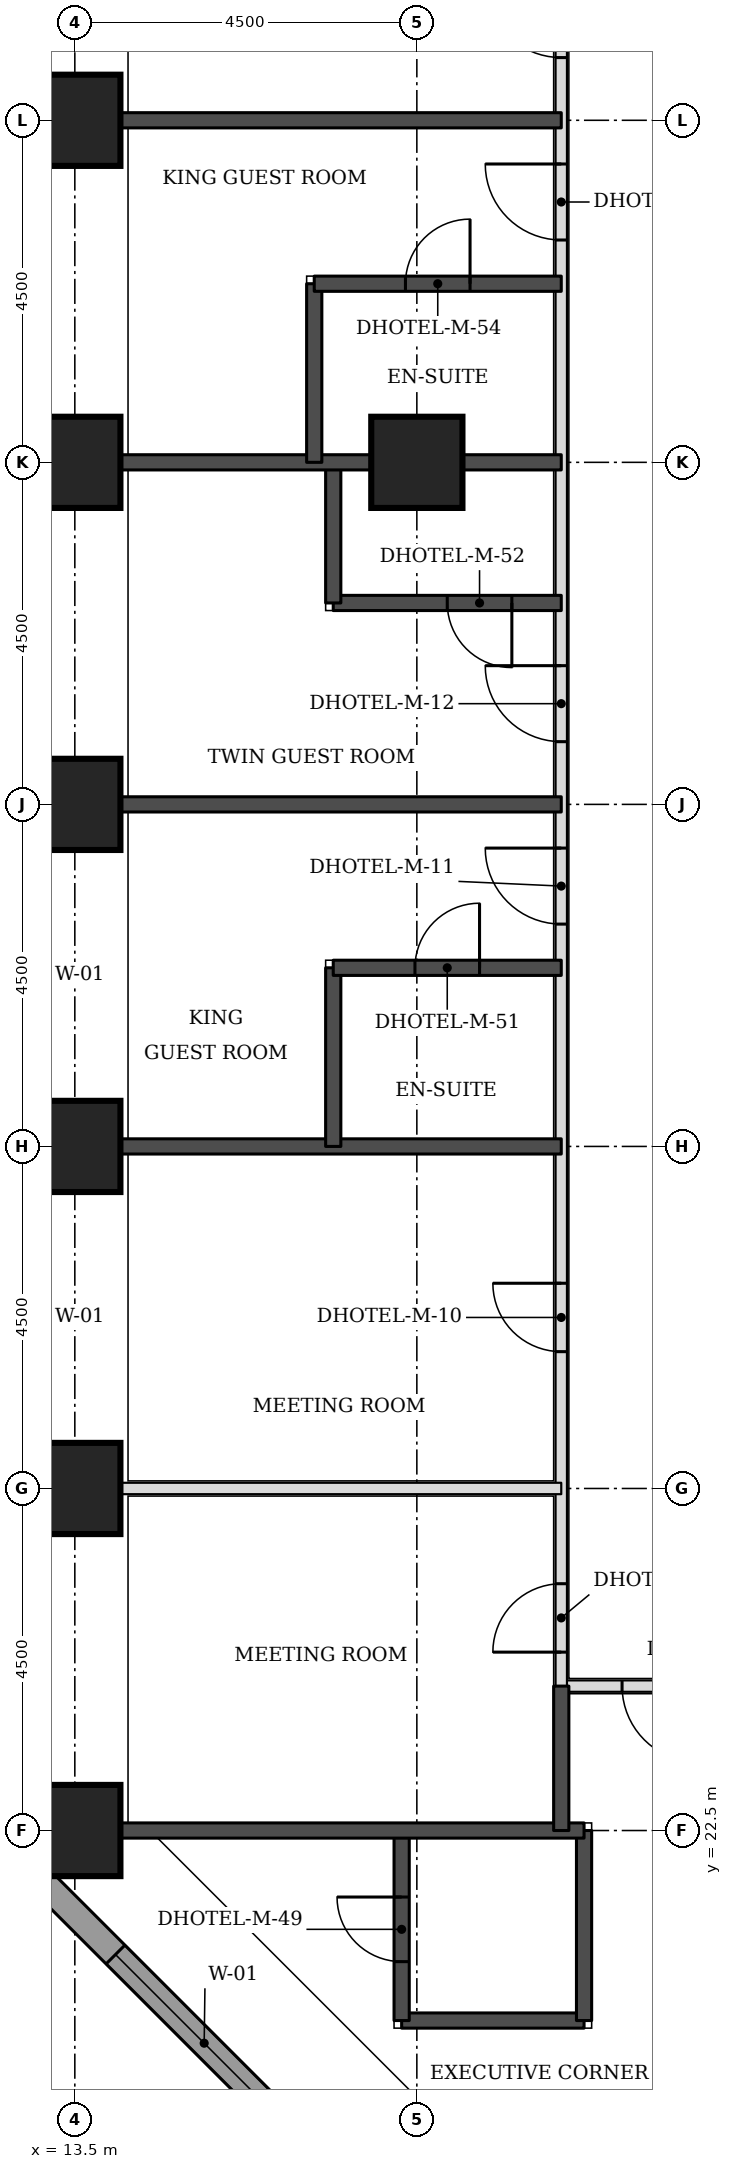
"""IFC4 building model, lengths in metres.
Left out: names, types, materials, properties, quantities, classifications, styles, units other than length and angle.
Written with IfcOpenShell. Run it as: python <this file> out.ifc"""

import sys

from ifc_helpers import new_model, si_unit, direction, frame, frame_2d, origin, origin_2d, place, context, subcontext, project, spatial, rectangle, extrude, element, fill, save


model = new_model("IFC4")
c1 = context("Model", 3, precision=1e-05, world=origin(), true_north=direction((0.0, 1.0)))
c2 = subcontext(c1, "Body", "Model", "MODEL_VIEW")
j1 = project(units=[si_unit("LENGTHUNIT", "METRE"), si_unit("PLANEANGLEUNIT", "RADIAN")], contexts=[c1])
p1 = place(None, origin())
s1 = spatial("IfcSite", under=j1, at=p1, CompositionType="ELEMENT")
p2 = place(p1, origin())
s2 = spatial("IfcBuilding", under=s1, at=p2, CompositionType="ELEMENT")
p3 = place(p2, frame((0.0, 0.0, 23.1)))
s3 = spatial("IfcBuildingStorey", under=s2, at=p3, CompositionType="ELEMENT", Elevation=23.1)
for number, where, z_axis, x_axis in (
    (1, (13.5, 22.5, 0.0), (0.0, 0.0, 1.0), (1.0, 0.0, 0.0)),
    (2, (13.5, 27.0, 0.0), (0.0, 0.0, 1.0), (1.0, 0.0, 0.0)),
    (3, (13.5, 31.5, 0.0), (0.0, 0.0, 1.0), (1.0, 0.0, 0.0)),
    (4, (13.5, 36.0, 0.0), (0.0, 0.0, 1.0), (1.0, 0.0, 0.0)),
    (5, (13.5, 40.5, 0.0), (0.0, 0.0, 1.0), (1.0, 0.0, 0.0)),
    (6, (18.0, 40.5, 0.0), (0.0, 0.0, 1.0), (1.0, 0.0, 0.0)),
    (7, (13.5, 45.0, 0.0), (0.0, 0.0, 1.0), (1.0, 0.0, 0.0)),
):
    element("IfcColumn", number, at=place(p3, frame(where, z_axis=z_axis, x_axis=x_axis)), inside=s3, PredefinedType="COLUMN", context=c2, shape_type="SweptSolid", body=[
        extrude(rectangle(XDim=1.2, YDim=1.2, at=origin_2d()), origin(), (0.0, 0.0, 1.0), 3.3),
    ])
p4 = place(p3, frame((12.674, 22.23, 0.0), z_axis=(0.0, 0.0, 1.0), x_axis=(0.707106781187, -0.707106781187, 0.0)))
e8 = element("IfcWall", 8, at=p4, inside=s3, PredefinedType="STANDARD", context=c2, shape_type="SweptSolid", body=[
    extrude(rectangle(XDim=7.151, YDim=0.35, at=frame_2d((3.576, 0.0))), origin(), (0.0, 0.0, 1.0), 3.055),
])
p5 = place(p4, frame((1.926, 0.0, 0.8)))
e9 = element("IfcOpeningElement", 9, at=p5, cuts=e8, PredefinedType="OPENING", context=c2, shape_type="SweptSolid", body=[
    extrude(rectangle(XDim=3.3, YDim=1.5, at=frame_2d((1.65, 0.75))), frame((0.0, 0.185, 0.0), z_axis=(0.0, -1.0, 0.0), x_axis=(1.0, 0.0, 0.0)), (0.0, 0.0, 1.0), 0.37),
])
p6 = place(p3, frame((19.9, 24.4, 0.0), z_axis=(0.0, 0.0, 1.0), x_axis=(1.0, 0.0, 0.0)))
e10 = element("IfcWall", 10, at=p6, inside=s3, PredefinedType="PARTITIONING", context=c2, shape_type="SweptSolid", body=[
    extrude(rectangle(XDim=32.2, YDim=0.15, at=frame_2d((16.1, 0.0))), origin(), (0.0, 0.0, 1.0), 3.08),
])
p7 = place(p6, frame((4.4, 0.0, 0.0)))
e11 = element("IfcOpeningElement", 11, at=p7, cuts=e10, PredefinedType="OPENING", context=c2, shape_type="SweptSolid", body=[
    extrude(rectangle(XDim=0.9, YDim=2.1, at=frame_2d((0.45, 1.05))), frame((0.0, 0.085, 0.0), z_axis=(0.0, -1.0, 0.0), x_axis=(1.0, 0.0, 0.0)), (0.0, 0.0, 1.0), 0.17),
])
p8 = place(p6, frame((8.9, 0.0, 0.0)))
e12 = element("IfcOpeningElement", 12, at=p8, cuts=e10, PredefinedType="OPENING", context=c2, shape_type="SweptSolid", body=[
    extrude(rectangle(XDim=0.9, YDim=2.1, at=frame_2d((0.45, 1.05))), frame((0.0, 0.085, 0.0), z_axis=(0.0, -1.0, 0.0), x_axis=(1.0, 0.0, 0.0)), (0.0, 0.0, 1.0), 0.17),
])
p9 = place(p6, frame((13.4, 0.0, 0.0)))
e13 = element("IfcOpeningElement", 13, at=p9, cuts=e10, PredefinedType="OPENING", context=c2, shape_type="SweptSolid", body=[
    extrude(rectangle(XDim=0.9, YDim=2.1, at=frame_2d((0.45, 1.05))), frame((0.0, 0.085, 0.0), z_axis=(0.0, -1.0, 0.0), x_axis=(1.0, 0.0, 0.0)), (0.0, 0.0, 1.0), 0.17),
])
p10 = place(p6, frame((17.9, 0.0, 0.0)))
e14 = element("IfcOpeningElement", 14, at=p10, cuts=e10, PredefinedType="OPENING", context=c2, shape_type="SweptSolid", body=[
    extrude(rectangle(XDim=0.9, YDim=2.1, at=frame_2d((0.45, 1.05))), frame((0.0, 0.085, 0.0), z_axis=(0.0, -1.0, 0.0), x_axis=(1.0, 0.0, 0.0)), (0.0, 0.0, 1.0), 0.17),
])
p11 = place(p6, frame((22.4, 0.0, 0.0)))
e15 = element("IfcOpeningElement", 15, at=p11, cuts=e10, PredefinedType="OPENING", context=c2, shape_type="SweptSolid", body=[
    extrude(rectangle(XDim=0.9, YDim=2.1, at=frame_2d((0.45, 1.05))), frame((0.0, 0.085, 0.0), z_axis=(0.0, -1.0, 0.0), x_axis=(1.0, 0.0, 0.0)), (0.0, 0.0, 1.0), 0.17),
])
p12 = place(p6, frame((26.9, 0.0, 0.0)))
e16 = element("IfcOpeningElement", 16, at=p12, cuts=e10, PredefinedType="OPENING", context=c2, shape_type="SweptSolid", body=[
    extrude(rectangle(XDim=0.9, YDim=2.1, at=frame_2d((0.45, 1.05))), frame((0.0, 0.085, 0.0), z_axis=(0.0, -1.0, 0.0), x_axis=(1.0, 0.0, 0.0)), (0.0, 0.0, 1.0), 0.17),
])
p13 = place(p6, frame((0.8, 0.0, 0.0)))
e17 = element("IfcOpeningElement", 17, at=p13, cuts=e10, PredefinedType="OPENING", context=c2, shape_type="SweptSolid", body=[
    extrude(rectangle(XDim=1.0, YDim=2.1, at=frame_2d((0.5, 1.05))), frame((0.0, 0.085, 0.0), z_axis=(0.0, -1.0, 0.0), x_axis=(1.0, 0.0, 0.0)), (0.0, 0.0, 1.0), 0.17),
])
p14 = place(p6, frame((30.4, 0.0, 0.0)))
e18 = element("IfcOpeningElement", 18, at=p14, cuts=e10, PredefinedType="OPENING", context=c2, shape_type="SweptSolid", body=[
    extrude(rectangle(XDim=1.0, YDim=2.1, at=frame_2d((0.5, 1.05))), frame((0.0, 0.085, 0.0), z_axis=(0.0, -1.0, 0.0), x_axis=(1.0, 0.0, 0.0)), (0.0, 0.0, 1.0), 0.17),
])
p15 = place(p3, frame((19.9, 24.4, 0.0), z_axis=(0.0, 0.0, 1.0), x_axis=(0.0, 1.0, 0.0)))
e19 = element("IfcWall", 19, at=p15, inside=s3, PredefinedType="PARTITIONING", context=c2, shape_type="SweptSolid", body=[
    extrude(rectangle(XDim=25.1, YDim=0.15, at=frame_2d((12.55, 0.0))), origin(), (0.0, 0.0, 1.0), 3.08),
])
p16 = place(p15, frame((0.447, 0.0, 0.0)))
e20 = element("IfcOpeningElement", 20, at=p16, cuts=e19, PredefinedType="OPENING", context=c2, shape_type="SweptSolid", body=[
    extrude(rectangle(XDim=0.9, YDim=2.1, at=frame_2d((0.45, 1.05))), frame((0.0, 0.085, 0.0), z_axis=(0.0, -1.0, 0.0), x_axis=(1.0, 0.0, 0.0)), (0.0, 0.0, 1.0), 0.17),
])
p17 = place(p15, frame((4.4, 0.0, 0.0)))
e21 = element("IfcOpeningElement", 21, at=p17, cuts=e19, PredefinedType="OPENING", context=c2, shape_type="SweptSolid", body=[
    extrude(rectangle(XDim=0.9, YDim=2.1, at=frame_2d((0.45, 1.05))), frame((0.0, 0.085, 0.0), z_axis=(0.0, -1.0, 0.0), x_axis=(1.0, 0.0, 0.0)), (0.0, 0.0, 1.0), 0.17),
])
p18 = place(p15, frame((10.025, 0.0, 0.0)))
e22 = element("IfcOpeningElement", 22, at=p18, cuts=e19, PredefinedType="OPENING", context=c2, shape_type="SweptSolid", body=[
    extrude(rectangle(XDim=1.0, YDim=2.1, at=frame_2d((0.5, 1.05))), frame((0.0, 0.085, 0.0), z_axis=(0.0, -1.0, 0.0), x_axis=(1.0, 0.0, 0.0)), (0.0, 0.0, 1.0), 0.17),
])
p19 = place(p15, frame((12.425, 0.0, 0.0)))
e23 = element("IfcOpeningElement", 23, at=p19, cuts=e19, PredefinedType="OPENING", context=c2, shape_type="SweptSolid", body=[
    extrude(rectangle(XDim=1.0, YDim=2.1, at=frame_2d((0.5, 1.05))), frame((0.0, 0.085, 0.0), z_axis=(0.0, -1.0, 0.0), x_axis=(1.0, 0.0, 0.0)), (0.0, 0.0, 1.0), 0.17),
])
p20 = place(p15, frame((19.025, 0.0, 0.0)))
e24 = element("IfcOpeningElement", 24, at=p20, cuts=e19, PredefinedType="OPENING", context=c2, shape_type="SweptSolid", body=[
    extrude(rectangle(XDim=1.0, YDim=2.1, at=frame_2d((0.5, 1.05))), frame((0.0, 0.085, 0.0), z_axis=(0.0, -1.0, 0.0), x_axis=(1.0, 0.0, 0.0)), (0.0, 0.0, 1.0), 0.17),
])
p21 = place(p15, frame((21.425, 0.0, 0.0)))
e25 = element("IfcOpeningElement", 25, at=p21, cuts=e19, PredefinedType="OPENING", context=c2, shape_type="SweptSolid", body=[
    extrude(rectangle(XDim=1.0, YDim=2.1, at=frame_2d((0.5, 1.05))), frame((0.0, 0.085, 0.0), z_axis=(0.0, -1.0, 0.0), x_axis=(1.0, 0.0, 0.0)), (0.0, 0.0, 1.0), 0.17),
])
p22 = place(p3, frame((17.8, 20.0, 0.0), z_axis=(0.0, 0.0, 1.0), x_axis=(1.0, 0.0, 0.0)))
e26 = element("IfcWall", 26, at=p22, inside=s3, PredefinedType="SOLIDWALL", context=c2, shape_type="SweptSolid", body=[
    extrude(rectangle(XDim=2.4, YDim=0.2, at=frame_2d((1.2, 0.0))), origin(), (0.0, 0.0, 1.0), 3.08),
])
p23 = place(p3, frame((17.8, 20.0, 0.0), z_axis=(0.0, 0.0, 1.0), x_axis=(0.0, 1.0, 0.0)))
e27 = element("IfcWall", 27, at=p23, inside=s3, PredefinedType="SOLIDWALL", context=c2, shape_type="SweptSolid", body=[
    extrude(rectangle(XDim=2.5, YDim=0.2, at=frame_2d((1.25, 0.0))), origin(), (0.0, 0.0, 1.0), 3.08),
])
p24 = place(p23, frame((0.775, 0.0, 0.0)))
e28 = element("IfcOpeningElement", 28, at=p24, cuts=e27, PredefinedType="OPENING", context=c2, shape_type="SweptSolid", body=[
    extrude(rectangle(XDim=0.85, YDim=2.1, at=frame_2d((0.425, 1.05))), frame((0.0, 0.11, 0.0), z_axis=(0.0, -1.0, 0.0), x_axis=(1.0, 0.0, 0.0)), (0.0, 0.0, 1.0), 0.22),
])
p25 = place(p3, frame((20.2, 20.0, 0.0), z_axis=(0.0, 0.0, 1.0), x_axis=(0.0, 1.0, 0.0)))
e29 = element("IfcWall", 29, at=p25, inside=s3, PredefinedType="SOLIDWALL", context=c2, shape_type="SweptSolid", body=[
    extrude(rectangle(XDim=2.5, YDim=0.2, at=frame_2d((1.25, 0.0))), origin(), (0.0, 0.0, 1.0), 3.08),
])
p26 = place(p3, frame((14.1, 22.5, 0.0), z_axis=(0.0, 0.0, 1.0), x_axis=(1.0, 0.0, 0.0)))
e30 = element("IfcWall", 30, at=p26, inside=s3, PredefinedType="SOLIDWALL", context=c2, shape_type="SweptSolid", body=[
    extrude(rectangle(XDim=6.1, YDim=0.2, at=frame_2d((3.05, 0.0))), origin(), (0.0, 0.0, 1.0), 3.08),
])
p27 = place(p3, frame((19.9, 22.5, 0.0), z_axis=(0.0, 0.0, 1.0), x_axis=(0.0, 1.0, 0.0)))
e31 = element("IfcWall", 31, at=p27, inside=s3, PredefinedType="SOLIDWALL", context=c2, shape_type="SweptSolid", body=[
    extrude(rectangle(XDim=1.9, YDim=0.2, at=frame_2d((0.95, 0.0))), origin(), (0.0, 0.0, 1.0), 3.08),
])
p28 = place(p3, frame((14.1, 31.5, 0.0), z_axis=(0.0, 0.0, 1.0), x_axis=(1.0, 0.0, 0.0)))
e32 = element("IfcWall", 32, at=p28, inside=s3, PredefinedType="SOLIDWALL", context=c2, shape_type="SweptSolid", body=[
    extrude(rectangle(XDim=5.8, YDim=0.2, at=frame_2d((2.9, 0.0))), origin(), (0.0, 0.0, 1.0), 3.08),
])
p29 = place(p3, frame((16.9, 31.5, 0.0), z_axis=(0.0, 0.0, 1.0), x_axis=(0.0, 1.0, 0.0)))
e33 = element("IfcWall", 33, at=p29, inside=s3, PredefinedType="SOLIDWALL", context=c2, shape_type="SweptSolid", body=[
    extrude(rectangle(XDim=2.35, YDim=0.2, at=frame_2d((1.175, 0.0))), origin(), (0.0, 0.0, 1.0), 3.08),
])
p30 = place(p3, frame((16.9, 33.85, 0.0), z_axis=(0.0, 0.0, 1.0), x_axis=(1.0, 0.0, 0.0)))
e34 = element("IfcWall", 34, at=p30, inside=s3, PredefinedType="SOLIDWALL", context=c2, shape_type="SweptSolid", body=[
    extrude(rectangle(XDim=3.0, YDim=0.2, at=frame_2d((1.5, 0.0))), origin(), (0.0, 0.0, 1.0), 3.08),
])
p31 = place(p30, frame((1.075, 0.0, 0.0)))
e35 = element("IfcOpeningElement", 35, at=p31, cuts=e34, PredefinedType="OPENING", context=c2, shape_type="SweptSolid", body=[
    extrude(rectangle(XDim=0.85, YDim=2.1, at=frame_2d((0.425, 1.05))), frame((0.0, 0.11, 0.0), z_axis=(0.0, -1.0, 0.0), x_axis=(1.0, 0.0, 0.0)), (0.0, 0.0, 1.0), 0.22),
])
p32 = place(p3, frame((14.1, 36.0, 0.0), z_axis=(0.0, 0.0, 1.0), x_axis=(1.0, 0.0, 0.0)))
e36 = element("IfcWall", 36, at=p32, inside=s3, PredefinedType="SOLIDWALL", context=c2, shape_type="SweptSolid", body=[
    extrude(rectangle(XDim=5.8, YDim=0.2, at=frame_2d((2.9, 0.0))), origin(), (0.0, 0.0, 1.0), 3.08),
])
p33 = place(p3, frame((16.9, 38.65, 0.0), z_axis=(0.0, 0.0, 1.0), x_axis=(1.0, 0.0, 0.0)))
e37 = element("IfcWall", 37, at=p33, inside=s3, PredefinedType="SOLIDWALL", context=c2, shape_type="SweptSolid", body=[
    extrude(rectangle(XDim=3.0, YDim=0.2, at=frame_2d((1.5, 0.0))), origin(), (0.0, 0.0, 1.0), 3.08),
])
p34 = place(p33, frame((1.5, 0.0, 0.0)))
e38 = element("IfcOpeningElement", 38, at=p34, cuts=e37, PredefinedType="OPENING", context=c2, shape_type="SweptSolid", body=[
    extrude(rectangle(XDim=0.85, YDim=2.1, at=frame_2d((0.425, 1.05))), frame((0.0, 0.11, 0.0), z_axis=(0.0, -1.0, 0.0), x_axis=(1.0, 0.0, 0.0)), (0.0, 0.0, 1.0), 0.22),
])
p35 = place(p3, frame((16.9, 38.65, 0.0), z_axis=(0.0, 0.0, 1.0), x_axis=(0.0, 1.0, 0.0)))
e39 = element("IfcWall", 39, at=p35, inside=s3, PredefinedType="SOLIDWALL", context=c2, shape_type="SweptSolid", body=[
    extrude(rectangle(XDim=1.85, YDim=0.2, at=frame_2d((0.925, 0.0))), origin(), (0.0, 0.0, 1.0), 3.08),
])
p36 = place(p3, frame((14.1, 40.5, 0.0), z_axis=(0.0, 0.0, 1.0), x_axis=(1.0, 0.0, 0.0)))
e40 = element("IfcWall", 40, at=p36, inside=s3, PredefinedType="SOLIDWALL", context=c2, shape_type="SweptSolid", body=[
    extrude(rectangle(XDim=5.8, YDim=0.2, at=frame_2d((2.9, 0.0))), origin(), (0.0, 0.0, 1.0), 3.08),
])
p37 = place(p3, frame((16.65, 40.5, 0.0), z_axis=(0.0, 0.0, 1.0), x_axis=(0.0, 1.0, 0.0)))
e41 = element("IfcWall", 41, at=p37, inside=s3, PredefinedType="SOLIDWALL", context=c2, shape_type="SweptSolid", body=[
    extrude(rectangle(XDim=2.35, YDim=0.2, at=frame_2d((1.175, 0.0))), origin(), (0.0, 0.0, 1.0), 3.08),
])
p38 = place(p3, frame((16.65, 42.85, 0.0), z_axis=(0.0, 0.0, 1.0), x_axis=(1.0, 0.0, 0.0)))
e42 = element("IfcWall", 42, at=p38, inside=s3, PredefinedType="SOLIDWALL", context=c2, shape_type="SweptSolid", body=[
    extrude(rectangle(XDim=3.25, YDim=0.2, at=frame_2d((1.625, 0.0))), origin(), (0.0, 0.0, 1.0), 3.08),
])
p39 = place(p38, frame((1.2, 0.0, 0.0)))
e43 = element("IfcOpeningElement", 43, at=p39, cuts=e42, PredefinedType="OPENING", context=c2, shape_type="SweptSolid", body=[
    extrude(rectangle(XDim=0.85, YDim=2.1, at=frame_2d((0.425, 1.05))), frame((0.0, 0.11, 0.0), z_axis=(0.0, -1.0, 0.0), x_axis=(1.0, 0.0, 0.0)), (0.0, 0.0, 1.0), 0.22),
])
p40 = place(p3, frame((14.1, 45.0, 0.0), z_axis=(0.0, 0.0, 1.0), x_axis=(1.0, 0.0, 0.0)))
e44 = element("IfcWall", 44, at=p40, inside=s3, PredefinedType="SOLIDWALL", context=c2, shape_type="SweptSolid", body=[
    extrude(rectangle(XDim=5.8, YDim=0.2, at=frame_2d((2.9, 0.0))), origin(), (0.0, 0.0, 1.0), 3.08),
])
p41 = place(p3, frame((14.1, 27.0, 0.0), z_axis=(0.0, 0.0, 1.0), x_axis=(1.0, 0.0, 0.0)))
e45 = element("IfcWall", 45, at=p41, inside=s3, PredefinedType="PARTITIONING", context=c2, shape_type="SweptSolid", body=[
    extrude(rectangle(XDim=5.8, YDim=0.15, at=frame_2d((2.9, 0.0))), origin(), (0.0, 0.0, 1.0), 3.08),
])
p42 = place(p5, origin())
e46 = element("IfcWindow", 46, at=p42, inside=s3, PartitioningType="SINGLE_PANEL", PredefinedType="WINDOW", context=c2, shape_type="SweptSolid", body=[
    extrude(rectangle(XDim=3.3, YDim=1.5, at=frame_2d((1.65, 0.75))), frame((0.0, 0.085, 0.0), z_axis=(0.0, -1.0, 0.0), x_axis=(1.0, 0.0, 0.0)), (0.0, 0.0, 1.0), 0.06),
])
fill(e9, e46)
p43 = place(p16, origin())
e47 = element("IfcDoor", 47, at=p43, inside=s3, OperationType="SINGLE_SWING_LEFT", PredefinedType="DOOR", context=c2, shape_type="SweptSolid", body=[
    extrude(rectangle(XDim=0.9, YDim=2.1, at=frame_2d((0.45, 1.05))), frame((0.0, 0.025, 0.0), z_axis=(0.0, -1.0, 0.0), x_axis=(1.0, 0.0, 0.0)), (0.0, 0.0, 1.0), 0.05),
])
fill(e20, e47)
p44 = place(p17, origin())
e48 = element("IfcDoor", 48, at=p44, inside=s3, OperationType="SINGLE_SWING_RIGHT", PredefinedType="DOOR", context=c2, shape_type="SweptSolid", body=[
    extrude(rectangle(XDim=0.9, YDim=2.1, at=frame_2d((0.45, 1.05))), frame((0.0, 0.025, 0.0), z_axis=(0.0, -1.0, 0.0), x_axis=(1.0, 0.0, 0.0)), (0.0, 0.0, 1.0), 0.05),
])
fill(e21, e48)
p45 = place(p18, origin())
e49 = element("IfcDoor", 49, at=p45, inside=s3, OperationType="SINGLE_SWING_RIGHT", PredefinedType="DOOR", context=c2, shape_type="SweptSolid", body=[
    extrude(rectangle(XDim=1.0, YDim=2.1, at=frame_2d((0.5, 1.05))), frame((0.0, 0.025, 0.0), z_axis=(0.0, -1.0, 0.0), x_axis=(1.0, 0.0, 0.0)), (0.0, 0.0, 1.0), 0.05),
])
fill(e22, e49)
p46 = place(p31, origin())
e50 = element("IfcDoor", 50, at=p46, inside=s3, OperationType="SINGLE_SWING_RIGHT", PredefinedType="DOOR", context=c2, shape_type="SweptSolid", body=[
    extrude(rectangle(XDim=0.85, YDim=2.1, at=frame_2d((0.425, 1.05))), frame((0.0, 0.025, 0.0), z_axis=(0.0, -1.0, 0.0), x_axis=(1.0, 0.0, 0.0)), (0.0, 0.0, 1.0), 0.05),
])
fill(e35, e50)
p47 = place(p19, origin())
e51 = element("IfcDoor", 51, at=p47, inside=s3, OperationType="SINGLE_SWING_RIGHT", PredefinedType="DOOR", context=c2, shape_type="SweptSolid", body=[
    extrude(rectangle(XDim=1.0, YDim=2.1, at=frame_2d((0.5, 1.05))), frame((0.0, 0.025, 0.0), z_axis=(0.0, -1.0, 0.0), x_axis=(1.0, 0.0, 0.0)), (0.0, 0.0, 1.0), 0.05),
])
fill(e23, e51)
p48 = place(p34, frame((0.85, 0.0, 0.0), z_axis=(0.0, 0.0, 1.0), x_axis=(-1.0, 0.0, 0.0)))
e52 = element("IfcDoor", 52, at=p48, inside=s3, OperationType="SINGLE_SWING_LEFT", PredefinedType="DOOR", context=c2, shape_type="SweptSolid", body=[
    extrude(rectangle(XDim=0.85, YDim=2.1, at=frame_2d((0.425, 1.05))), frame((0.0, 0.025, 0.0), z_axis=(0.0, -1.0, 0.0), x_axis=(1.0, 0.0, 0.0)), (0.0, 0.0, 1.0), 0.05),
])
fill(e38, e52)
p49 = place(p20, origin())
e53 = element("IfcDoor", 53, at=p49, inside=s3, OperationType="SINGLE_SWING_RIGHT", PredefinedType="DOOR", context=c2, shape_type="SweptSolid", body=[
    extrude(rectangle(XDim=1.0, YDim=2.1, at=frame_2d((0.5, 1.05))), frame((0.0, 0.025, 0.0), z_axis=(0.0, -1.0, 0.0), x_axis=(1.0, 0.0, 0.0)), (0.0, 0.0, 1.0), 0.05),
])
fill(e24, e53)
p50 = place(p39, origin())
e54 = element("IfcDoor", 54, at=p50, inside=s3, OperationType="SINGLE_SWING_RIGHT", PredefinedType="DOOR", context=c2, shape_type="SweptSolid", body=[
    extrude(rectangle(XDim=0.85, YDim=2.1, at=frame_2d((0.425, 1.05))), frame((0.0, 0.025, 0.0), z_axis=(0.0, -1.0, 0.0), x_axis=(1.0, 0.0, 0.0)), (0.0, 0.0, 1.0), 0.05),
])
fill(e43, e54)
p51 = place(p21, origin())
e55 = element("IfcDoor", 55, at=p51, inside=s3, OperationType="SINGLE_SWING_RIGHT", PredefinedType="DOOR", context=c2, shape_type="SweptSolid", body=[
    extrude(rectangle(XDim=1.0, YDim=2.1, at=frame_2d((0.5, 1.05))), frame((0.0, 0.025, 0.0), z_axis=(0.0, -1.0, 0.0), x_axis=(1.0, 0.0, 0.0)), (0.0, 0.0, 1.0), 0.05),
])
fill(e25, e55)
p52 = place(p13, frame((1.0, 0.0, 0.0), z_axis=(0.0, 0.0, 1.0), x_axis=(-1.0, 0.0, 0.0)))
e56 = element("IfcDoor", 56, at=p52, inside=s3, OperationType="SINGLE_SWING_LEFT", PredefinedType="DOOR", context=c2, shape_type="SweptSolid", body=[
    extrude(rectangle(XDim=1.0, YDim=2.1, at=frame_2d((0.5, 1.05))), frame((0.0, 0.025, 0.0), z_axis=(0.0, -1.0, 0.0), x_axis=(1.0, 0.0, 0.0)), (0.0, 0.0, 1.0), 0.05),
])
fill(e17, e56)
p53 = place(p24, origin())
e57 = element("IfcDoor", 57, at=p53, inside=s3, OperationType="SINGLE_SWING_RIGHT", PredefinedType="DOOR", context=c2, shape_type="SweptSolid", body=[
    extrude(rectangle(XDim=0.85, YDim=2.1, at=frame_2d((0.425, 1.05))), frame((0.0, 0.025, 0.0), z_axis=(0.0, -1.0, 0.0), x_axis=(1.0, 0.0, 0.0)), (0.0, 0.0, 1.0), 0.05),
])
fill(e28, e57)
save(model, sys.argv[1])
